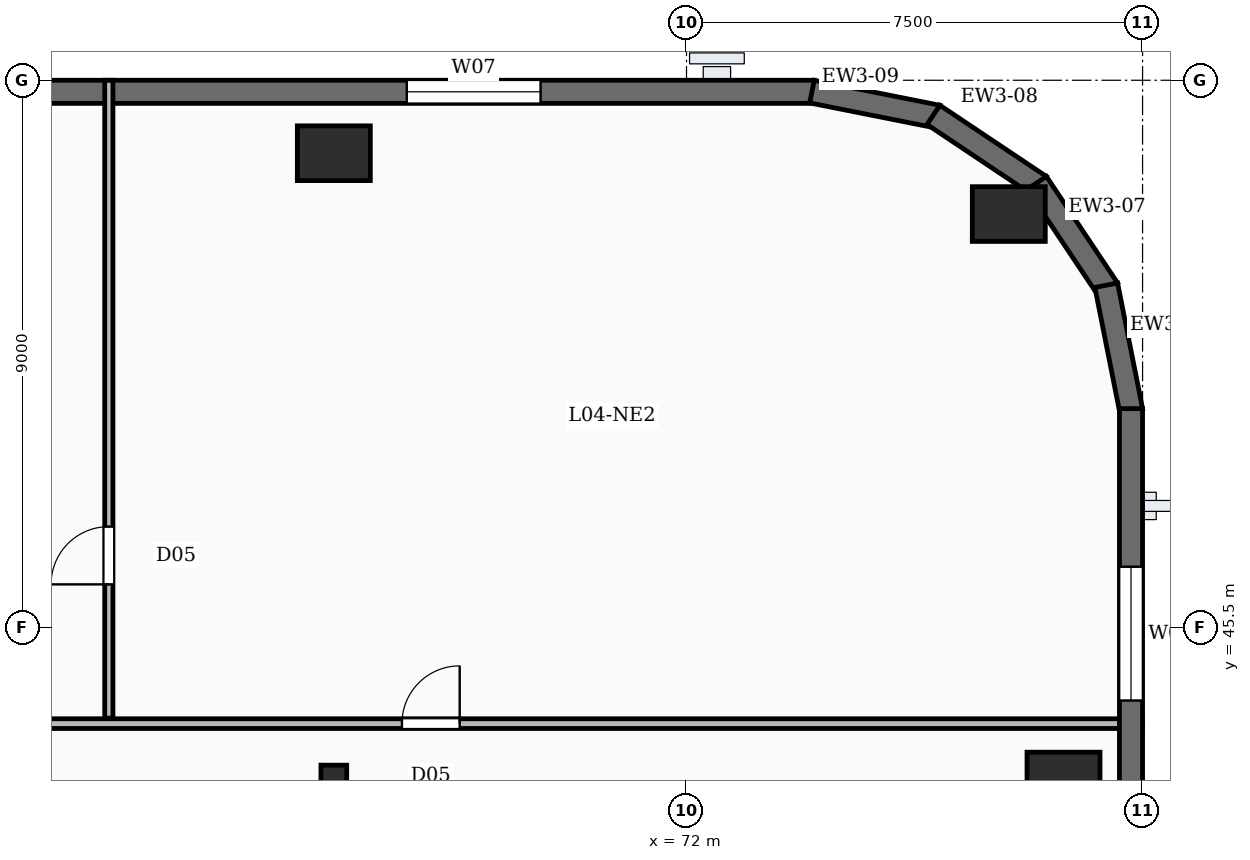
"""IFC4 building model, lengths in metres.
Left out: names, types, materials, properties, quantities, classifications, styles, units other than length and angle.
Written with IfcOpenShell. Run it as: python <this file> out.ifc"""

import sys

from ifc_helpers import new_model, si_unit, direction, frame, frame_2d, origin, origin_2d, place, context, subcontext, project, spatial, rectangle, i_section, extrude, element, fill, save


model = new_model("IFC4")
c1 = context("Model", 3, precision=1e-05, world=origin(), true_north=direction((0.0, 1.0)))
c2 = subcontext(c1, "Body", "Model", "MODEL_VIEW")
j1 = project(units=[si_unit("LENGTHUNIT", "METRE"), si_unit("PLANEANGLEUNIT", "RADIAN")], contexts=[c1])
p1 = place(None, origin())
s1 = spatial("IfcSite", under=j1, at=p1, CompositionType="ELEMENT")
p2 = place(p1, origin())
s2 = spatial("IfcBuilding", under=s1, at=p2, CompositionType="ELEMENT")
p3 = place(p2, frame((0.0, 0.0, 23.0)))
s3 = spatial("IfcBuildingStorey", under=s2, at=p3, CompositionType="ELEMENT", Elevation=23.0)
for number, where, z_axis, x_axis in (
    (1, (78.2, 43.0, -0.35), (0.0, 0.0, 1.0), (1.0, 0.0, 0.0)),
    (2, (77.3, 52.3, -0.35), (0.0, 0.0, 1.0), (1.0, 0.0, 0.0)),
    (3, (66.2, 53.3, -0.35), (0.0, 0.0, 1.0), (1.0, 0.0, 0.0)),
):
    element("IfcColumn", number, at=place(p3, frame(where, z_axis=z_axis, x_axis=x_axis)), inside=s3, PredefinedType="COLUMN", context=c2, shape_type="SweptSolid", body=[
        extrude(rectangle(XDim=1.2, YDim=0.9, at=origin_2d()), origin(), (0.0, 0.0, 1.0), 5.0),
    ])
p4 = place(p3, frame((66.2, 43.0, -0.35), z_axis=(0.0, 0.0, 1.0), x_axis=(1.0, 0.0, 0.0)))
e4 = element("IfcColumn", 4, at=p4, inside=s3, PredefinedType="COLUMN", context=c2, shape_type="SweptSolid", body=[
    extrude(i_section(OverallWidth=0.424, OverallDepth=0.474, WebThickness=0.048, FlangeThickness=0.077, FilletRadius=0.02, at=origin_2d()), origin(), (0.0, 0.0, 1.0), 5.0),
])
p5 = place(p3, frame((79.31, 49.1, 0.0), z_axis=(0.0, 0.0, 1.0), x_axis=(0.0, -1.0, 0.0)))
e5 = element("IfcWall", 5, at=p5, inside=s3, PredefinedType="SOLIDWALL", context=c2, shape_type="SweptSolid", body=[
    extrude(rectangle(XDim=43.7, YDim=0.38, at=frame_2d((21.85, 0.0))), origin(), (0.0, 0.0, 1.0), 4.65),
])
p6 = place(p5, frame((2.6, 0.0, 0.95)))
e6 = element("IfcOpeningElement", 6, at=p6, cuts=e5, PredefinedType="OPENING", context=c2, shape_type="SweptSolid", body=[
    extrude(rectangle(XDim=2.2, YDim=2.5, at=frame_2d((1.1, 1.25))), frame((0.0, 0.2, 0.0), z_axis=(0.0, -1.0, 0.0), x_axis=(1.0, 0.0, 0.0)), (0.0, 0.0, 1.0), 0.4),
])
p7 = place(p5, frame((8.0, 0.0, 0.95)))
e7 = element("IfcOpeningElement", 7, at=p7, cuts=e5, PredefinedType="OPENING", context=c2, shape_type="SweptSolid", body=[
    extrude(rectangle(XDim=2.2, YDim=2.5, at=frame_2d((1.1, 1.25))), frame((0.0, 0.2, 0.0), z_axis=(0.0, -1.0, 0.0), x_axis=(1.0, 0.0, 0.0)), (0.0, 0.0, 1.0), 0.4),
])
p8 = place(p5, frame((18.8, 0.0, 0.95)))
e8 = element("IfcOpeningElement", 8, at=p8, cuts=e5, PredefinedType="OPENING", context=c2, shape_type="SweptSolid", body=[
    extrude(rectangle(XDim=2.2, YDim=2.5, at=frame_2d((1.1, 1.25))), frame((0.0, 0.2, 0.0), z_axis=(0.0, -1.0, 0.0), x_axis=(1.0, 0.0, 0.0)), (0.0, 0.0, 1.0), 0.4),
])
p9 = place(p5, frame((24.2, 0.0, 0.95)))
e9 = element("IfcOpeningElement", 9, at=p9, cuts=e5, PredefinedType="OPENING", context=c2, shape_type="SweptSolid", body=[
    extrude(rectangle(XDim=2.2, YDim=2.5, at=frame_2d((1.1, 1.25))), frame((0.0, 0.2, 0.0), z_axis=(0.0, -1.0, 0.0), x_axis=(1.0, 0.0, 0.0)), (0.0, 0.0, 1.0), 0.4),
])
p10 = place(p5, frame((29.6, 0.0, 0.95)))
e10 = element("IfcOpeningElement", 10, at=p10, cuts=e5, PredefinedType="OPENING", context=c2, shape_type="SweptSolid", body=[
    extrude(rectangle(XDim=2.2, YDim=2.5, at=frame_2d((1.1, 1.25))), frame((0.0, 0.2, 0.0), z_axis=(0.0, -1.0, 0.0), x_axis=(1.0, 0.0, 0.0)), (0.0, 0.0, 1.0), 0.4),
])
for number, where, z_axis, x_axis in (
    (11, (78.903, 51.129, 0.0), (0.0, 0.0, 1.0), (0.195, -0.981, 0.0)),
    (12, (77.76, 52.813, 0.0), (0.0, 0.0, 1.0), (0.556, -0.832, 0.0)),
    (13, (76.061, 53.931, 0.0), (0.0, 0.0, 1.0), (0.832, -0.556, 0.0)),
    (14, (74.063, 54.314, 0.0), (0.0, 0.0, 1.0), (0.981, -0.195, 0.0)),
):
    element("IfcWall", number, at=place(p3, frame(where, z_axis=z_axis, x_axis=x_axis)), inside=s3, PredefinedType="SOLIDWALL", context=c2, shape_type="SweptSolid", body=[
        extrude(rectangle(XDim=2.107, YDim=0.38, at=frame_2d((1.053, 0.0))), origin(), (0.0, 0.0, 1.0), 4.65),
    ])
p11 = place(p3, frame((5.4, 54.31, 0.0), z_axis=(0.0, 0.0, 1.0), x_axis=(1.0, 0.0, 0.0)))
e15 = element("IfcWall", 15, at=p11, inside=s3, PredefinedType="SOLIDWALL", context=c2, shape_type="SweptSolid", body=[
    extrude(rectangle(XDim=68.7, YDim=0.38, at=frame_2d((34.35, 0.0))), origin(), (0.0, 0.0, 1.0), 4.65),
])
p12 = place(p11, frame((13.4, 0.0, 0.95)))
e16 = element("IfcOpeningElement", 16, at=p12, cuts=e15, PredefinedType="OPENING", context=c2, shape_type="SweptSolid", body=[
    extrude(rectangle(XDim=2.2, YDim=2.5, at=frame_2d((1.1, 1.25))), frame((0.0, 0.2, 0.0), z_axis=(0.0, -1.0, 0.0), x_axis=(1.0, 0.0, 0.0)), (0.0, 0.0, 1.0), 0.4),
])
p13 = place(p11, frame((24.2, 0.0, 0.95)))
e17 = element("IfcOpeningElement", 17, at=p13, cuts=e15, PredefinedType="OPENING", context=c2, shape_type="SweptSolid", body=[
    extrude(rectangle(XDim=2.2, YDim=2.5, at=frame_2d((1.1, 1.25))), frame((0.0, 0.2, 0.0), z_axis=(0.0, -1.0, 0.0), x_axis=(1.0, 0.0, 0.0)), (0.0, 0.0, 1.0), 0.4),
])
p14 = place(p11, frame((35.0, 0.0, 0.95)))
e18 = element("IfcOpeningElement", 18, at=p14, cuts=e15, PredefinedType="OPENING", context=c2, shape_type="SweptSolid", body=[
    extrude(rectangle(XDim=2.2, YDim=2.5, at=frame_2d((1.1, 1.25))), frame((0.0, 0.2, 0.0), z_axis=(0.0, -1.0, 0.0), x_axis=(1.0, 0.0, 0.0)), (0.0, 0.0, 1.0), 0.4),
])
p15 = place(p11, frame((40.4, 0.0, 0.95)))
e19 = element("IfcOpeningElement", 19, at=p15, cuts=e15, PredefinedType="OPENING", context=c2, shape_type="SweptSolid", body=[
    extrude(rectangle(XDim=2.2, YDim=2.5, at=frame_2d((1.1, 1.25))), frame((0.0, 0.2, 0.0), z_axis=(0.0, -1.0, 0.0), x_axis=(1.0, 0.0, 0.0)), (0.0, 0.0, 1.0), 0.4),
])
p16 = place(p11, frame((51.2, 0.0, 0.95)))
e20 = element("IfcOpeningElement", 20, at=p16, cuts=e15, PredefinedType="OPENING", context=c2, shape_type="SweptSolid", body=[
    extrude(rectangle(XDim=2.2, YDim=2.5, at=frame_2d((1.1, 1.25))), frame((0.0, 0.2, 0.0), z_axis=(0.0, -1.0, 0.0), x_axis=(1.0, 0.0, 0.0)), (0.0, 0.0, 1.0), 0.4),
])
p17 = place(p11, frame((62.0, 0.0, 0.95)))
e21 = element("IfcOpeningElement", 21, at=p17, cuts=e15, PredefinedType="OPENING", context=c2, shape_type="SweptSolid", body=[
    extrude(rectangle(XDim=2.2, YDim=2.5, at=frame_2d((1.1, 1.25))), frame((0.0, 0.2, 0.0), z_axis=(0.0, -1.0, 0.0), x_axis=(1.0, 0.0, 0.0)), (0.0, 0.0, 1.0), 0.4),
])
p18 = place(p3, frame((62.5, 44.01, 0.0), z_axis=(0.0, 0.0, 1.0), x_axis=(0.0, 1.0, 0.0)))
e22 = element("IfcWall", 22, at=p18, inside=s3, PredefinedType="PARTITIONING", context=c2, shape_type="SweptSolid", body=[
    extrude(rectangle(XDim=10.49, YDim=0.135, at=frame_2d((5.245, 0.0))), origin(), (0.0, 0.0, 1.0), 3.71),
])
p19 = place(p18, frame((2.2, 0.0, 0.0)))
e23 = element("IfcOpeningElement", 23, at=p19, cuts=e22, PredefinedType="OPENING", context=c2, shape_type="SweptSolid", body=[
    extrude(rectangle(XDim=0.95, YDim=2.15, at=frame_2d((0.475, 1.075))), frame((0.0, 0.077, 0.0), z_axis=(0.0, -1.0, 0.0), x_axis=(1.0, 0.0, 0.0)), (0.0, 0.0, 1.0), 0.155),
])
p20 = place(p3, frame((49.8, 43.92, 0.0), z_axis=(0.0, 0.0, 1.0), x_axis=(1.0, 0.0, 0.0)))
e24 = element("IfcWall", 24, at=p20, inside=s3, PredefinedType="PARTITIONING", context=c2, shape_type="SweptSolid", body=[
    extrude(rectangle(XDim=29.7, YDim=0.16, at=frame_2d((14.85, 0.0))), origin(), (0.0, 0.0, 1.0), 3.71),
])
p21 = place(p20, frame((5.87, 0.0, 0.0)))
e25 = element("IfcOpeningElement", 25, at=p21, cuts=e24, PredefinedType="OPENING", context=c2, shape_type="SweptSolid", body=[
    extrude(rectangle(XDim=0.95, YDim=2.15, at=frame_2d((0.475, 1.075))), frame((0.0, 0.09, 0.0), z_axis=(0.0, -1.0, 0.0), x_axis=(1.0, 0.0, 0.0)), (0.0, 0.0, 1.0), 0.18),
])
p22 = place(p20, frame((17.52, 0.0, 0.0)))
e26 = element("IfcOpeningElement", 26, at=p22, cuts=e24, PredefinedType="OPENING", context=c2, shape_type="SweptSolid", body=[
    extrude(rectangle(XDim=0.95, YDim=2.15, at=frame_2d((0.475, 1.075))), frame((0.0, 0.09, 0.0), z_axis=(0.0, -1.0, 0.0), x_axis=(1.0, 0.0, 0.0)), (0.0, 0.0, 1.0), 0.18),
])
p23 = place(p6, origin())
e27 = element("IfcWindow", 27, at=p23, inside=s3, PartitioningType="DOUBLE_PANEL_VERTICAL", PredefinedType="WINDOW", context=c2, shape_type="SweptSolid", body=[
    extrude(rectangle(XDim=2.2, YDim=2.5, at=frame_2d((1.1, 1.25))), frame((0.0, 0.03, 0.0), z_axis=(0.0, -1.0, 0.0), x_axis=(1.0, 0.0, 0.0)), (0.0, 0.0, 1.0), 0.06),
])
fill(e6, e27)
p24 = place(p17, origin())
e28 = element("IfcWindow", 28, at=p24, inside=s3, PartitioningType="DOUBLE_PANEL_VERTICAL", PredefinedType="WINDOW", context=c2, shape_type="SweptSolid", body=[
    extrude(rectangle(XDim=2.2, YDim=2.5, at=frame_2d((1.1, 1.25))), frame((0.0, 0.03, 0.0), z_axis=(0.0, -1.0, 0.0), x_axis=(1.0, 0.0, 0.0)), (0.0, 0.0, 1.0), 0.06),
])
fill(e21, e28)
p25 = place(p19, origin())
e29 = element("IfcDoor", 29, at=p25, inside=s3, OperationType="SINGLE_SWING_LEFT", PredefinedType="DOOR", context=c2, shape_type="SweptSolid", body=[
    extrude(rectangle(XDim=0.95, YDim=2.15, at=frame_2d((0.475, 1.075))), frame((0.0, 0.025, 0.0), z_axis=(0.0, -1.0, 0.0), x_axis=(1.0, 0.0, 0.0)), (0.0, 0.0, 1.0), 0.05),
])
fill(e23, e29)
p26 = place(p22, origin())
e30 = element("IfcDoor", 30, at=p26, inside=s3, OperationType="SINGLE_SWING_RIGHT", PredefinedType="DOOR", context=c2, shape_type="SweptSolid", body=[
    extrude(rectangle(XDim=0.95, YDim=2.15, at=frame_2d((0.475, 1.075))), frame((0.0, 0.025, 0.0), z_axis=(0.0, -1.0, 0.0), x_axis=(1.0, 0.0, 0.0)), (0.0, 0.0, 1.0), 0.05),
])
fill(e26, e30)
save(model, sys.argv[1])
